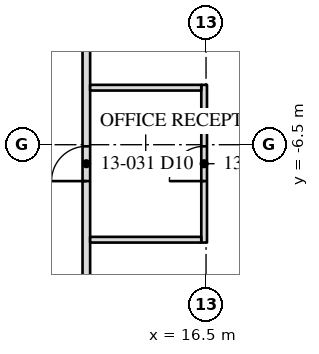
"""IFC4 building model, lengths in metres.
Left out: names, types, materials, properties, quantities, classifications, styles, units other than length and angle.
Written with IfcOpenShell. Run it as: python <this file> out.ifc"""

import sys

from ifc_helpers import new_model, si_unit, direction, frame, frame_2d, origin, place, context, subcontext, project, spatial, rectangle, extrude, element, fill, save


model = new_model("IFC4")
c1 = context("Model", 3, precision=1e-05, world=origin(), true_north=direction((0.0, 1.0)))
c2 = subcontext(c1, "Body", "Model", "MODEL_VIEW")
j1 = project(units=[si_unit("LENGTHUNIT", "METRE"), si_unit("PLANEANGLEUNIT", "RADIAN")], contexts=[c1])
p1 = place(None, origin())
s1 = spatial("IfcSite", under=j1, at=p1, CompositionType="ELEMENT")
p2 = place(p1, origin())
s2 = spatial("IfcBuilding", under=s1, at=p2, CompositionType="ELEMENT")
p3 = place(p2, frame((0.0, 0.0, 57.0)))
s3 = spatial("IfcBuildingStorey", under=s2, at=p3, CompositionType="ELEMENT", Elevation=57.0)
p4 = place(p3, frame((13.35, -13.45, 0.0), z_axis=(0.0, 0.0, 1.0), x_axis=(0.0, 1.0, 0.0)))
e1 = element("IfcWall", 1, at=p4, inside=s3, PredefinedType="PARTITIONING", context=c2, shape_type="SweptSolid", body=[
    extrude(rectangle(XDim=26.7, YDim=0.2, at=frame_2d((13.35, 0.0))), origin(), (0.0, 0.0, 1.0), 3.91),
])
p5 = place(p4, frame((5.992, 0.0, 0.0)))
e2 = element("IfcOpeningElement", 2, at=p5, cuts=e1, PredefinedType="OPENING", context=c2, shape_type="SweptSolid", body=[
    extrude(rectangle(XDim=0.915, YDim=2.134, at=frame_2d((0.458, 1.067))), frame((0.0, 0.11, 0.0), z_axis=(0.0, -1.0, 0.0), x_axis=(1.0, 0.0, 0.0)), (0.0, 0.0, 1.0), 0.22),
])
p6 = place(p3, frame((16.45, -9.075, 0.0), z_axis=(0.0, 0.0, 1.0), x_axis=(0.0, 1.0, 0.0)))
e3 = element("IfcWall", 3, at=p6, inside=s3, PredefinedType="PARTITIONING", context=c2, shape_type="SweptSolid", body=[
    extrude(rectangle(XDim=4.15, YDim=0.15, at=frame_2d((2.075, 0.0))), origin(), (0.0, 0.0, 1.0), 3.91),
])
p7 = place(p6, frame((1.617, 0.0, 0.0)))
e4 = element("IfcOpeningElement", 4, at=p7, cuts=e3, PredefinedType="OPENING", context=c2, shape_type="SweptSolid", body=[
    extrude(rectangle(XDim=0.915, YDim=2.134, at=frame_2d((0.458, 1.067))), frame((0.0, 0.085, 0.0), z_axis=(0.0, -1.0, 0.0), x_axis=(1.0, 0.0, 0.0)), (0.0, 0.0, 1.0), 0.17),
])
for number, where, z_axis, x_axis in (
    (5, (16.375, -9.0, 0.0), (0.0, 0.0, 1.0), (-1.0, 0.0, 0.0)),
    (6, (16.375, -5.0, 0.0), (0.0, 0.0, 1.0), (-1.0, 0.0, 0.0)),
):
    element("IfcWall", number, at=place(p3, frame(where, z_axis=z_axis, x_axis=x_axis)), inside=s3, PredefinedType="PARTITIONING", context=c2, shape_type="SweptSolid", body=[
        extrude(rectangle(XDim=2.925, YDim=0.15, at=frame_2d((1.462, 0.0))), origin(), (0.0, 0.0, 1.0), 3.91),
    ])
p8 = place(p7, origin())
e7 = element("IfcDoor", 7, at=p8, inside=s3, OperationType="SINGLE_SWING_LEFT", PredefinedType="DOOR", context=c2, shape_type="SweptSolid", body=[
    extrude(rectangle(XDim=0.915, YDim=2.134, at=frame_2d((0.458, 1.067))), frame((0.0, 0.025, 0.0), z_axis=(0.0, -1.0, 0.0), x_axis=(1.0, 0.0, 0.0)), (0.0, 0.0, 1.0), 0.05),
])
fill(e4, e7)
p9 = place(p5, origin())
e8 = element("IfcDoor", 8, at=p9, inside=s3, OperationType="SINGLE_SWING_LEFT", PredefinedType="DOOR", context=c2, shape_type="SweptSolid", body=[
    extrude(rectangle(XDim=0.915, YDim=2.134, at=frame_2d((0.458, 1.067))), frame((0.0, 0.025, 0.0), z_axis=(0.0, -1.0, 0.0), x_axis=(1.0, 0.0, 0.0)), (0.0, 0.0, 1.0), 0.05),
])
fill(e2, e8)
save(model, sys.argv[1])
